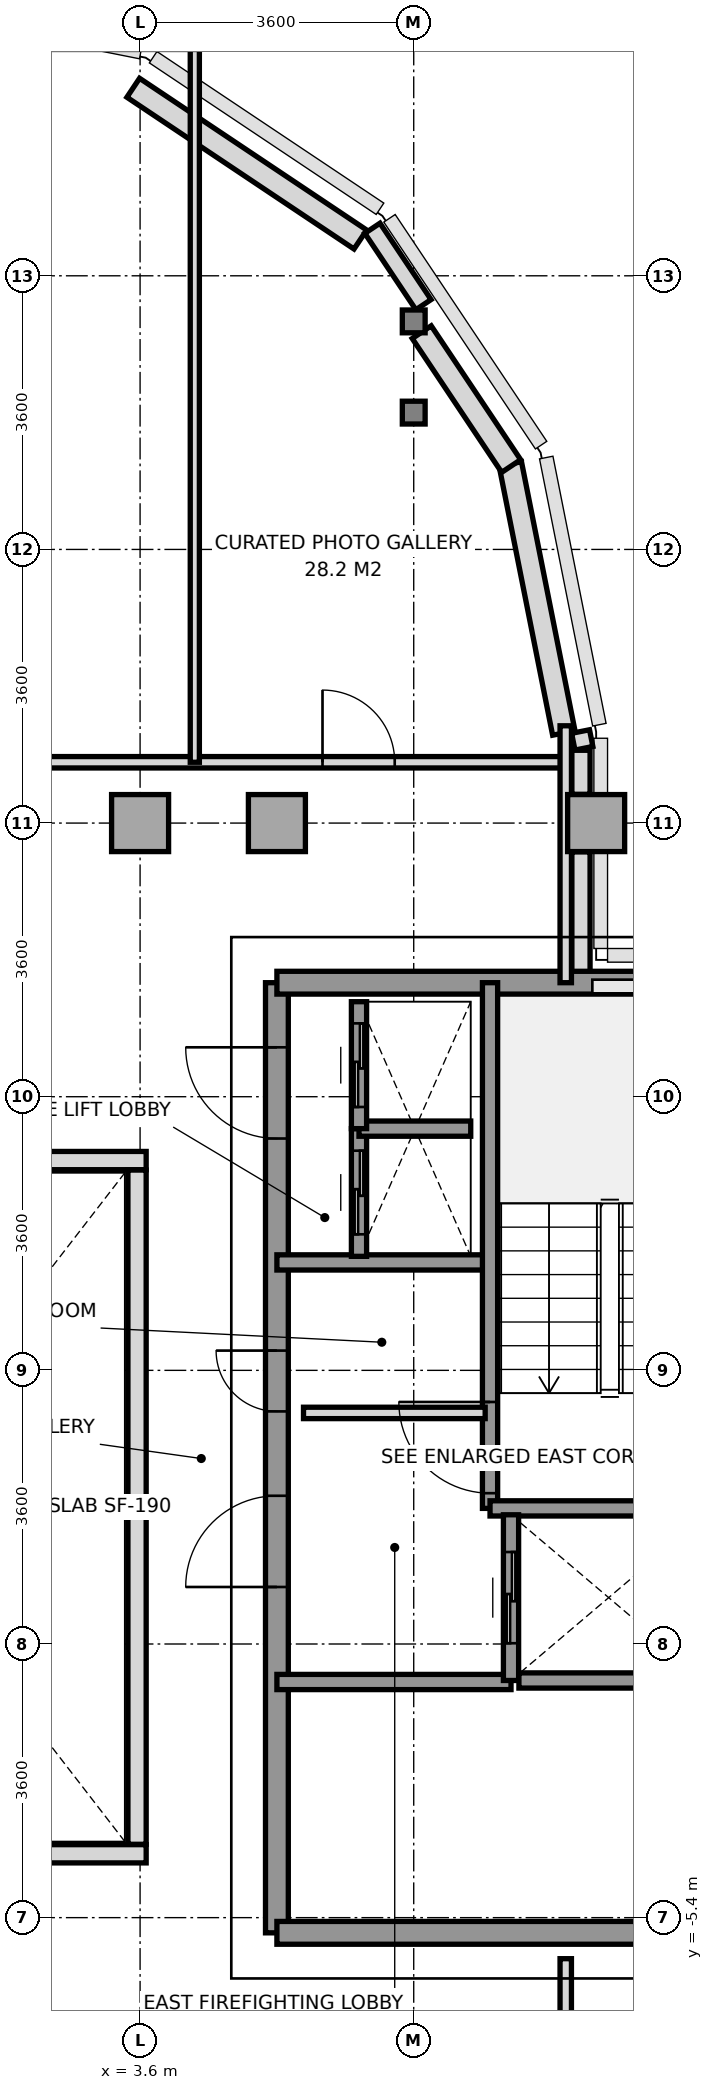
"""IFC4 building model, lengths in metres.
Left out: names, types, materials, properties, quantities, classifications, styles, units other than length and angle.
Written with IfcOpenShell. Run it as: python <this file> out.ifc"""

import sys

from ifc_helpers import new_model, si_unit, direction, frame, frame_2d, origin, origin_2d, place, context, subcontext, project, spatial, rectangle, i_section, extrude, source, transform, mapped, element, fill, save


model = new_model("IFC4")
c1 = context("Model", 3, precision=1e-05, world=origin(), true_north=direction((0.0, 1.0)))
c2 = subcontext(c1, "Body", "Model", "MODEL_VIEW")
j1 = project(units=[si_unit("LENGTHUNIT", "METRE"), si_unit("PLANEANGLEUNIT", "RADIAN")], contexts=[c1])
p1 = place(None, origin())
s1 = spatial("IfcSite", under=j1, at=p1, CompositionType="ELEMENT")
p2 = place(p1, origin())
s2 = spatial("IfcBuilding", under=s1, at=p2, CompositionType="ELEMENT")
p3 = place(p2, frame((0.0, 0.0, 249.2)))
s3 = spatial("IfcBuildingStorey", under=s2, at=p3, CompositionType="ELEMENT", Elevation=249.2)
m1 = source(origin(), c2, "Body", "SweptSolid", [
    extrude(rectangle(XDim=0.75, YDim=0.75, at=origin_2d()), origin(), (0.0, 0.0, 1.0), 3.01),
])
for number, where, z_axis, x_axis in (
    (1, (3.6, 9.0, 0.0), (0.0, 0.0, 1.0), (1.0, 0.0, 0.0)),
    (2, (5.4, 9.0, 0.0), (0.0, 0.0, 1.0), (1.0, 0.0, 0.0)),
):
    element("IfcColumn", number, at=place(p3, frame(where, z_axis=z_axis, x_axis=x_axis)), inside=s3, PredefinedType="COLUMN", context=c2, shape_type="MappedRepresentation", body=[
        mapped(m1, transform((0.0, 0.0, 0.0), x_axis=(1.0, 0.0, 0.0), y_axis=(0.0, 1.0, 0.0), z_axis=(0.0, 0.0, 1.0), scale=1.0)),
    ])
m2 = source(origin(), c2, "Body", "SweptSolid", [
    extrude(i_section(OverallWidth=0.3, OverallDepth=0.3, WebThickness=0.011, FlangeThickness=0.019, at=origin_2d()), origin(), (0.0, 0.0, 1.0), 3.01),
])
for number, where, z_axis, x_axis in (
    (3, (7.2, 14.4, 0.0), (0.0, 0.0, 1.0), (1.0, 0.0, 0.0)),
    (4, (7.2, 15.6, 0.0), (0.0, 0.0, 1.0), (1.0, 0.0, 0.0)),
):
    element("IfcColumn", number, at=place(p3, frame(where, z_axis=z_axis, x_axis=x_axis)), inside=s3, PredefinedType="COLUMN", context=c2, shape_type="MappedRepresentation", body=[
        mapped(m2, transform((0.0, 0.0, 0.0), x_axis=(1.0, 0.0, 0.0), y_axis=(0.0, 1.0, 0.0), z_axis=(0.0, 0.0, 1.0), scale=1.0)),
    ])
p4 = place(p3, frame((9.6, 9.0, 0.0), z_axis=(0.0, 0.0, 1.0), x_axis=(1.0, 0.0, 0.0)))
e5 = element("IfcColumn", 5, at=p4, inside=s3, PredefinedType="COLUMN", context=c2, shape_type="MappedRepresentation", body=[
    mapped(m1, transform((0.0, 0.0, 0.0), x_axis=(1.0, 0.0, 0.0), y_axis=(0.0, 1.0, 0.0), z_axis=(0.0, 0.0, 1.0), scale=1.0)),
])
p5 = place(p3, frame((9.175, 10.185, 0.0), z_axis=(0.0, 0.0, 1.0), x_axis=(-0.195114232679, 0.980780523974, 0.0)))
e6 = element("IfcWall", 6, at=p5, inside=s3, PredefinedType="SOLIDWALL", context=c2, shape_type="SweptSolid", body=[
    extrude(rectangle(XDim=3.609, YDim=0.3, at=frame_2d((1.804, 0.0))), origin(), (0.0, 0.0, 1.0), 3.01),
])
p6 = place(p3, frame((8.482, 13.698, 0.0), z_axis=(0.0, 0.0, 1.0), x_axis=(-0.555604299396, 0.831446848868, 0.0)))
e7 = element("IfcWall", 7, at=p6, inside=s3, PredefinedType="SOLIDWALL", context=c2, shape_type="SweptSolid", body=[
    extrude(rectangle(XDim=2.118, YDim=0.3, at=frame_2d((1.059, 0.0))), origin(), (0.0, 0.0, 1.0), 2.61),
])
p7 = place(p3, frame((6.498, 16.677, 0.0), z_axis=(0.0, 0.0, 1.0), x_axis=(-0.831443568068, 0.555609208993, 0.0)))
e8 = element("IfcWall", 8, at=p7, inside=s3, PredefinedType="SOLIDWALL", context=c2, shape_type="SweptSolid", body=[
    extrude(rectangle(XDim=3.594, YDim=0.3, at=frame_2d((1.797, 0.0))), origin(), (0.0, 0.0, 1.0), 3.01),
])
p8 = place(p3, frame((6.656, 16.825, 0.0), z_axis=(0.0, 0.0, 1.0), x_axis=(0.555585388542, -0.831459485506, 0.0)))
e9 = element("IfcWall", 9, at=p8, inside=s3, PredefinedType="PARAPET", context=c2, shape_type="SweptSolid", body=[
    extrude(rectangle(XDim=1.209, YDim=0.24, at=frame_2d((0.604, 0.0))), origin(), (0.0, 0.0, 1.0), 1.15),
])
p9 = place(p3, frame((9.395, 10.204, 0.0), z_axis=(0.0, 0.0, 1.0), x_axis=(0.194859894132, -0.980831087221, 0.0)))
e10 = element("IfcWall", 10, at=p9, inside=s3, PredefinedType="PARAPET", context=c2, shape_type="SweptSolid", body=[
    extrude(rectangle(XDim=0.224, YDim=0.24, at=frame_2d((0.112, 0.0))), origin(), (0.0, 0.0, 1.0), 1.15),
])
p10 = place(p3, frame((9.4, 9.958, 0.0), z_axis=(0.0, 0.0, 1.0), x_axis=(0.0, -1.0, 0.0)))
e11 = element("IfcWall", 11, at=p10, inside=s3, PredefinedType="PARAPET", context=c2, shape_type="SweptSolid", body=[
    extrude(rectangle(XDim=0.58, YDim=0.24, at=frame_2d((0.29, 0.0))), origin(), (0.0, 0.0, 1.0), 1.15),
])
p11 = place(p3, frame((9.4, 8.622, 0.0), z_axis=(0.0, 0.0, 1.0), x_axis=(0.0, -1.0, 0.0)))
e12 = element("IfcWall", 12, at=p11, inside=s3, PredefinedType="PARAPET", context=c2, shape_type="SweptSolid", body=[
    extrude(rectangle(XDim=1.669, YDim=0.24, at=frame_2d((0.834, 0.0))), origin(), (0.0, 0.0, 1.0), 1.15),
])
p12 = place(p3, frame((5.4, -5.6, 0.0), z_axis=(0.0, 0.0, 1.0), x_axis=(0.0, 1.0, 0.0)))
e13 = element("IfcWall", 13, at=p12, inside=s3, PredefinedType="SHEAR", context=c2, shape_type="SweptSolid", body=[
    extrude(rectangle(XDim=12.5, YDim=0.3, at=frame_2d((6.25, 0.0))), origin(), (0.0, 0.0, 1.0), 3.01),
])
p13 = place(p12, frame((4.55, 0.0, 0.0)))
e14 = element("IfcOpeningElement", 14, at=p13, cuts=e13, PredefinedType="OPENING", context=c2, shape_type="SweptSolid", body=[
    extrude(rectangle(XDim=1.2, YDim=2.2, at=frame_2d((0.6, 1.1))), frame((0.0, 0.16, 0.0), z_axis=(0.0, -1.0, 0.0), x_axis=(1.0, 0.0, 0.0)), (0.0, 0.0, 1.0), 0.32),
])
p14 = place(p12, frame((10.45, 0.0, 0.0)))
e15 = element("IfcOpeningElement", 15, at=p14, cuts=e13, PredefinedType="OPENING", context=c2, shape_type="SweptSolid", body=[
    extrude(rectangle(XDim=1.2, YDim=2.2, at=frame_2d((0.6, 1.1))), frame((0.0, 0.16, 0.0), z_axis=(0.0, -1.0, 0.0), x_axis=(1.0, 0.0, 0.0)), (0.0, 0.0, 1.0), 0.32),
])
p15 = place(p12, frame((6.86, 0.0, 0.0)))
e16 = element("IfcOpeningElement", 16, at=p15, cuts=e13, PredefinedType="OPENING", context=c2, shape_type="SweptSolid", body=[
    extrude(rectangle(XDim=0.8, YDim=2.1, at=frame_2d((0.4, 1.05))), frame((0.0, 0.16, 0.0), z_axis=(0.0, -1.0, 0.0), x_axis=(1.0, 0.0, 0.0)), (0.0, 0.0, 1.0), 0.32),
])
p16 = place(p3, frame((5.4, 6.9, 0.0), z_axis=(0.0, 0.0, 1.0), x_axis=(1.0, 0.0, 0.0)))
e17 = element("IfcWall", 17, at=p16, inside=s3, PredefinedType="SHEAR", context=c2, shape_type="SweptSolid", body=[
    extrude(rectangle(XDim=5.956, YDim=0.3, at=frame_2d((2.978, 0.0))), origin(), (0.0, 0.0, 1.0), 3.01),
])
p17 = place(p3, frame((5.4, -5.6, 0.0), z_axis=(0.0, 0.0, 1.0), x_axis=(1.0, 0.0, 0.0)))
e18 = element("IfcWall", 18, at=p17, inside=s3, PredefinedType="SHEAR", context=c2, shape_type="SweptSolid", body=[
    extrude(rectangle(XDim=7.8, YDim=0.3, at=frame_2d((3.9, 0.0))), origin(), (0.0, 0.0, 1.0), 3.01),
])
p18 = place(p3, frame((5.4, 3.22, 0.0), z_axis=(0.0, 0.0, 1.0), x_axis=(1.0, 0.0, 0.0)))
e19 = element("IfcWall", 19, at=p18, inside=s3, PredefinedType="SOLIDWALL", context=c2, shape_type="SweptSolid", body=[
    extrude(rectangle(XDim=2.78, YDim=0.2, at=frame_2d((1.39, 0.0))), origin(), (0.0, 0.0, 1.0), 3.01),
])
p19 = place(p3, frame((5.4, -2.3, 0.0), z_axis=(0.0, 0.0, 1.0), x_axis=(1.0, 0.0, 0.0)))
e20 = element("IfcWall", 20, at=p19, inside=s3, PredefinedType="SOLIDWALL", context=c2, shape_type="SweptSolid", body=[
    extrude(rectangle(XDim=3.08, YDim=0.2, at=frame_2d((1.54, 0.0))), origin(), (0.0, 0.0, 1.0), 3.01),
])
p20 = place(p3, frame((8.204, -0.016, 0.0), z_axis=(0.0, 0.0, 1.0), x_axis=(0.0, 1.0, 0.0)))
e21 = element("IfcWall", 21, at=p20, inside=s3, PredefinedType="SOLIDWALL", context=c2, shape_type="SweptSolid", body=[
    extrude(rectangle(XDim=6.916, YDim=0.2, at=frame_2d((3.458, 0.0))), origin(), (0.0, 0.0, 1.0), 3.01),
])
p21 = place(p20, frame((0.2, 0.0, 0.0)))
e22 = element("IfcOpeningElement", 22, at=p21, cuts=e21, PredefinedType="OPENING", context=c2, shape_type="SweptSolid", body=[
    extrude(rectangle(XDim=1.2, YDim=2.2, at=frame_2d((0.6, 1.1))), frame((0.0, 0.11, 0.0), z_axis=(0.0, -1.0, 0.0), x_axis=(1.0, 0.0, 0.0)), (0.0, 0.0, 1.0), 0.22),
])
p22 = place(p3, frame((8.204, -0.016, 0.0), z_axis=(0.0, 0.0, 1.0), x_axis=(1.0, 0.0, 0.0)))
e23 = element("IfcWall", 23, at=p22, inside=s3, PredefinedType="SOLIDWALL", context=c2, shape_type="SweptSolid", body=[
    extrude(rectangle(XDim=3.152, YDim=0.2, at=frame_2d((1.576, 0.0))), origin(), (0.0, 0.0, 1.0), 3.01),
])
p23 = place(p3, frame((8.48, -2.28, 0.0), z_axis=(0.0, 0.0, 1.0), x_axis=(0.0, 1.0, 0.0)))
e24 = element("IfcWall", 24, at=p23, inside=s3, PredefinedType="SOLIDWALL", context=c2, shape_type="SweptSolid", body=[
    extrude(rectangle(XDim=2.18, YDim=0.2, at=frame_2d((1.09, 0.0))), origin(), (0.0, 0.0, 1.0), 3.01),
])
p24 = place(p23, frame((0.49, 0.0, 0.0)))
e25 = element("IfcOpeningElement", 25, at=p24, cuts=e24, PredefinedType="OPENING", context=c2, shape_type="SweptSolid", body=[
    extrude(rectangle(XDim=1.2, YDim=2.2, at=frame_2d((0.6, 1.1))), frame((0.0, 0.11, 0.0), z_axis=(0.0, -1.0, 0.0), x_axis=(1.0, 0.0, 0.0)), (0.0, 0.0, 1.0), 0.22),
])
p25 = place(p3, frame((8.584, -2.28, 0.0), z_axis=(0.0, 0.0, 1.0), x_axis=(1.0, 0.0, 0.0)))
e26 = element("IfcWall", 26, at=p25, inside=s3, PredefinedType="SOLIDWALL", context=c2, shape_type="SweptSolid", body=[
    extrude(rectangle(XDim=2.362, YDim=0.2, at=frame_2d((1.181, 0.0))), origin(), (0.0, 0.0, 1.0), 3.01),
])
p26 = place(p3, frame((6.48, 3.3, 0.0), z_axis=(0.0, 0.0, 1.0), x_axis=(0.0, 1.0, 0.0)))
e27 = element("IfcWall", 27, at=p26, inside=s3, PredefinedType="SOLIDWALL", context=c2, shape_type="SweptSolid", body=[
    extrude(rectangle(XDim=1.68, YDim=0.2, at=frame_2d((0.84, 0.0))), origin(), (0.0, 0.0, 1.0), 3.01),
])
p27 = place(p26, frame((0.29, 0.0, 0.0)))
e28 = element("IfcOpeningElement", 28, at=p27, cuts=e27, PredefinedType="OPENING", context=c2, shape_type="SweptSolid", body=[
    extrude(rectangle(XDim=1.1, YDim=2.2, at=frame_2d((0.55, 1.1))), frame((0.0, 0.11, 0.0), z_axis=(0.0, -1.0, 0.0), x_axis=(1.0, 0.0, 0.0)), (0.0, 0.0, 1.0), 0.22),
])
p28 = place(p3, frame((6.48, 4.98, 0.0), z_axis=(0.0, 0.0, 1.0), x_axis=(1.0, 0.0, 0.0)))
e29 = element("IfcWall", 29, at=p28, inside=s3, PredefinedType="SOLIDWALL", context=c2, shape_type="SweptSolid", body=[
    extrude(rectangle(XDim=1.47, YDim=0.2, at=frame_2d((0.735, 0.0))), origin(), (0.0, 0.0, 1.0), 3.01),
])
p29 = place(p3, frame((6.48, 4.98, 0.0), z_axis=(0.0, 0.0, 1.0), x_axis=(0.0, 1.0, 0.0)))
e30 = element("IfcWall", 30, at=p29, inside=s3, PredefinedType="SOLIDWALL", context=c2, shape_type="SweptSolid", body=[
    extrude(rectangle(XDim=1.67, YDim=0.2, at=frame_2d((0.835, 0.0))), origin(), (0.0, 0.0, 1.0), 3.01),
])
p30 = place(p29, frame((0.285, 0.0, 0.0)))
e31 = element("IfcOpeningElement", 31, at=p30, cuts=e30, PredefinedType="OPENING", context=c2, shape_type="SweptSolid", body=[
    extrude(rectangle(XDim=1.1, YDim=2.2, at=frame_2d((0.55, 1.1))), frame((0.0, 0.11, 0.0), z_axis=(0.0, -1.0, 0.0), x_axis=(1.0, 0.0, 0.0)), (0.0, 0.0, 1.0), 0.22),
])
p31 = place(p3, frame((5.75, 1.24, 0.0), z_axis=(0.0, 0.0, 1.0), x_axis=(1.0, 0.0, 0.0)))
e32 = element("IfcWall", 32, at=p31, inside=s3, PredefinedType="PARTITIONING", context=c2, shape_type="SweptSolid", body=[
    extrude(rectangle(XDim=2.39, YDim=0.15, at=frame_2d((1.195, 0.0))), origin(), (0.0, 0.0, 1.0), 3.01),
])
p32 = place(p3, frame((-9.2, 9.8, 0.0), z_axis=(0.0, 0.0, 1.0), x_axis=(1.0, 0.0, 0.0)))
e33 = element("IfcWall", 33, at=p32, inside=s3, PredefinedType="PARTITIONING", context=c2, shape_type="SweptSolid", body=[
    extrude(rectangle(XDim=18.4, YDim=0.15, at=frame_2d((9.2, 0.0))), origin(), (0.0, 0.0, 1.0), 3.01),
])
p33 = place(p32, frame((2.2, 0.0, 0.0)))
e34 = element("IfcOpeningElement", 34, at=p33, cuts=e33, PredefinedType="OPENING", context=c2, shape_type="SweptSolid", body=[
    extrude(rectangle(XDim=0.95, YDim=2.15, at=frame_2d((0.475, 1.075))), frame((0.0, 0.085, 0.0), z_axis=(0.0, -1.0, 0.0), x_axis=(1.0, 0.0, 0.0)), (0.0, 0.0, 1.0), 0.17),
])
p34 = place(p32, frame((8.8, 0.0, 0.0)))
e35 = element("IfcOpeningElement", 35, at=p34, cuts=e33, PredefinedType="OPENING", context=c2, shape_type="SweptSolid", body=[
    extrude(rectangle(XDim=1.1, YDim=2.2, at=frame_2d((0.55, 1.1))), frame((0.0, 0.085, 0.0), z_axis=(0.0, -1.0, 0.0), x_axis=(1.0, 0.0, 0.0)), (0.0, 0.0, 1.0), 0.17),
])
p35 = place(p32, frame((15.2, 0.0, 0.0)))
e36 = element("IfcOpeningElement", 36, at=p35, cuts=e33, PredefinedType="OPENING", context=c2, shape_type="SweptSolid", body=[
    extrude(rectangle(XDim=0.95, YDim=2.15, at=frame_2d((0.475, 1.075))), frame((0.0, 0.085, 0.0), z_axis=(0.0, -1.0, 0.0), x_axis=(1.0, 0.0, 0.0)), (0.0, 0.0, 1.0), 0.17),
])
p36 = place(p3, frame((9.2, 6.9, 0.0), z_axis=(0.0, 0.0, 1.0), x_axis=(0.0, 1.0, 0.0)))
e37 = element("IfcWall", 37, at=p36, inside=s3, PredefinedType="PARTITIONING", context=c2, shape_type="SweptSolid", body=[
    extrude(rectangle(XDim=3.38, YDim=0.15, at=frame_2d((1.69, 0.0))), origin(), (0.0, 0.0, 1.0), 2.61),
])
p37 = place(p3, frame((4.32, 9.8, 0.0), z_axis=(0.0, 0.0, 1.0), x_axis=(0.0, 1.0, 0.0)))
e38 = element("IfcWall", 38, at=p37, inside=s3, PredefinedType="PARTITIONING", context=c2, shape_type="SweptSolid", body=[
    extrude(rectangle(XDim=9.45, YDim=0.12, at=frame_2d((4.725, 0.0))), origin(), (0.0, 0.0, 1.0), 2.61),
])
p38 = place(p3, frame((9.2, -10.28, 0.0), z_axis=(0.0, 0.0, 1.0), x_axis=(0.0, 1.0, 0.0)))
e39 = element("IfcWall", 39, at=p38, inside=s3, PredefinedType="PARTITIONING", context=c2, shape_type="SweptSolid", body=[
    extrude(rectangle(XDim=4.34, YDim=0.15, at=frame_2d((2.17, 0.0))), origin(), (0.0, 0.0, 1.0), 2.61),
])
for number, where, z_axis, x_axis in (
    (40, (-3.68, -4.56, 0.0), (0.0, 0.0, 1.0), (1.0, 0.0, 0.0)),
    (41, (-3.68, 4.56, 0.0), (0.0, 0.0, 1.0), (1.0, 0.0, 0.0)),
):
    element("IfcWall", number, at=place(p3, frame(where, z_axis=z_axis, x_axis=x_axis)), inside=s3, PredefinedType="PARAPET", context=c2, shape_type="SweptSolid", body=[
        extrude(rectangle(XDim=7.36, YDim=0.24, at=frame_2d((3.68, 0.0))), origin(), (0.0, 0.0, 1.0), 1.15),
    ])
p39 = place(p3, frame((3.56, -4.435, 0.0), z_axis=(0.0, 0.0, 1.0), x_axis=(0.0, 1.0, 0.0)))
e42 = element("IfcWall", 42, at=p39, inside=s3, PredefinedType="PARAPET", context=c2, shape_type="SweptSolid", body=[
    extrude(rectangle(XDim=8.87, YDim=0.24, at=frame_2d((4.435, 0.0))), origin(), (0.0, 0.0, 1.0), 1.15),
])
m3 = source(origin(), c2, "Body", "SweptSolid", [
    extrude(rectangle(XDim=1.2, YDim=2.2, at=frame_2d((0.6, 1.1))), frame((0.0, 0.025, 0.0), z_axis=(0.0, -1.0, 0.0), x_axis=(1.0, 0.0, 0.0)), (0.0, 0.0, 1.0), 0.05),
])
p40 = place(p21, origin())
e43 = element("IfcDoor", 43, at=p40, inside=s3, OperationType="SINGLE_SWING_RIGHT", PredefinedType="DOOR", context=c2, shape_type="MappedRepresentation", body=[
    mapped(m3, transform((0.0, 0.0, 0.0), x_axis=(1.0, 0.0, 0.0), y_axis=(0.0, 1.0, 0.0), z_axis=(0.0, 0.0, 1.0), scale=1.0)),
])
fill(e22, e43)
p41 = place(p13, origin())
e44 = element("IfcDoor", 44, at=p41, inside=s3, OperationType="SINGLE_SWING_LEFT", PredefinedType="DOOR", context=c2, shape_type="MappedRepresentation", body=[
    mapped(m3, transform((0.0, 0.0, 0.0), x_axis=(1.0, 0.0, 0.0), y_axis=(0.0, 1.0, 0.0), z_axis=(0.0, 0.0, 1.0), scale=1.0)),
])
fill(e14, e44)
p42 = place(p14, origin())
e45 = element("IfcDoor", 45, at=p42, inside=s3, OperationType="SINGLE_SWING_RIGHT", PredefinedType="DOOR", context=c2, shape_type="MappedRepresentation", body=[
    mapped(m3, transform((0.0, 0.0, 0.0), x_axis=(1.0, 0.0, 0.0), y_axis=(0.0, 1.0, 0.0), z_axis=(0.0, 0.0, 1.0), scale=1.0)),
])
fill(e15, e45)
m4 = source(origin(), c2, "Body", "SweptSolid", [
    extrude(rectangle(XDim=0.8, YDim=2.1, at=frame_2d((0.4, 1.05))), frame((0.0, 0.025, 0.0), z_axis=(0.0, -1.0, 0.0), x_axis=(1.0, 0.0, 0.0)), (0.0, 0.0, 1.0), 0.05),
])
p43 = place(p15, origin())
e46 = element("IfcDoor", 46, at=p43, inside=s3, OperationType="SINGLE_SWING_RIGHT", PredefinedType="DOOR", context=c2, shape_type="MappedRepresentation", body=[
    mapped(m4, transform((0.0, 0.0, 0.0), x_axis=(1.0, 0.0, 0.0), y_axis=(0.0, 1.0, 0.0), z_axis=(0.0, 0.0, 1.0), scale=1.0)),
])
fill(e16, e46)
p44 = place(p24, origin())
e47 = element("IfcDoor", 47, at=p44, inside=s3, OperationType="SLIDING_TO_RIGHT", PredefinedType="DOOR", context=c2, shape_type="MappedRepresentation", body=[
    mapped(m3, transform((0.0, 0.0, 0.0), x_axis=(1.0, 0.0, 0.0), y_axis=(0.0, 1.0, 0.0), z_axis=(0.0, 0.0, 1.0), scale=1.0)),
])
fill(e25, e47)
m5 = source(origin(), c2, "Body", "SweptSolid", [
    extrude(rectangle(XDim=1.1, YDim=2.2, at=frame_2d((0.55, 1.1))), frame((0.0, 0.025, 0.0), z_axis=(0.0, -1.0, 0.0), x_axis=(1.0, 0.0, 0.0)), (0.0, 0.0, 1.0), 0.05),
])
p45 = place(p27, origin())
e48 = element("IfcDoor", 48, at=p45, inside=s3, OperationType="SLIDING_TO_LEFT", PredefinedType="DOOR", context=c2, shape_type="MappedRepresentation", body=[
    mapped(m5, transform((0.0, 0.0, 0.0), x_axis=(1.0, 0.0, 0.0), y_axis=(0.0, 1.0, 0.0), z_axis=(0.0, 0.0, 1.0), scale=1.0)),
])
fill(e28, e48)
p46 = place(p30, origin())
e49 = element("IfcDoor", 49, at=p46, inside=s3, OperationType="SLIDING_TO_LEFT", PredefinedType="DOOR", context=c2, shape_type="MappedRepresentation", body=[
    mapped(m5, transform((0.0, 0.0, 0.0), x_axis=(1.0, 0.0, 0.0), y_axis=(0.0, 1.0, 0.0), z_axis=(0.0, 0.0, 1.0), scale=1.0)),
])
fill(e31, e49)
m6 = source(origin(), c2, "Body", "SweptSolid", [
    extrude(rectangle(XDim=0.95, YDim=2.15, at=frame_2d((0.475, 1.075))), frame((0.0, 0.025, 0.0), z_axis=(0.0, -1.0, 0.0), x_axis=(1.0, 0.0, 0.0)), (0.0, 0.0, 1.0), 0.05),
])
p47 = place(p35, origin())
e50 = element("IfcDoor", 50, at=p47, inside=s3, OperationType="SINGLE_SWING_LEFT", PredefinedType="DOOR", context=c2, shape_type="MappedRepresentation", body=[
    mapped(m6, transform((0.0, 0.0, 0.0), x_axis=(1.0, 0.0, 0.0), y_axis=(0.0, 1.0, 0.0), z_axis=(0.0, 0.0, 1.0), scale=1.0)),
])
fill(e36, e50)
save(model, sys.argv[1])
